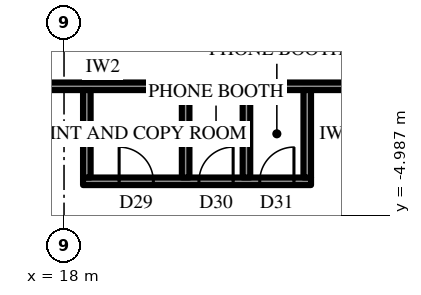
"""IFC4 building model, lengths in metres.
Left out: names, types, materials, properties, quantities, classifications, styles, units other than length and angle.
Written with IfcOpenShell. Run it as: python <this file> out.ifc"""

import sys

from ifc_helpers import new_model, si_unit, direction, frame, frame_2d, origin, place, context, subcontext, project, spatial, rectangle, extrude, element, fill, save


model = new_model("IFC4")
c1 = context("Model", 3, precision=1e-05, world=origin(), true_north=direction((0.0, 1.0)))
c2 = subcontext(c1, "Body", "Model", "MODEL_VIEW")
j1 = project(units=[si_unit("LENGTHUNIT", "METRE"), si_unit("PLANEANGLEUNIT", "RADIAN")], contexts=[c1])
p1 = place(None, origin())
s1 = spatial("IfcSite", under=j1, at=p1, CompositionType="ELEMENT")
p2 = place(p1, origin())
s2 = spatial("IfcBuilding", under=s1, at=p2, CompositionType="ELEMENT")
p3 = place(p2, frame((0.0, 0.0, 345.1)))
s3 = spatial("IfcBuildingStorey", under=s2, at=p3, CompositionType="ELEMENT", Elevation=345.1)
p4 = place(p3, frame((24.677, -10.458, 0.0), z_axis=(0.0, 0.0, 1.0), x_axis=(0.499996453679, 0.866027451244, 0.0)))
e1 = element("IfcWall", 1, at=p4, inside=s3, PredefinedType="SOLIDWALL", context=c2, shape_type="SweptSolid", body=[
    extrude(rectangle(XDim=9.564, YDim=0.3, at=frame_2d((4.782, 0.0))), origin(), (0.0, 0.0, 1.0), 2.9),
])
p5 = place(p4, frame((1.866, 0.0, 0.6)))
e2 = element("IfcOpeningElement", 2, at=p5, cuts=e1, PredefinedType="OPENING", context=c2, shape_type="SweptSolid", body=[
    extrude(rectangle(XDim=2.55, YDim=2.05, at=frame_2d((1.275, 1.025))), frame((0.0, 0.16, 0.0), z_axis=(0.0, -1.0, 0.0), x_axis=(1.0, 0.0, 0.0)), (0.0, 0.0, 1.0), 0.32),
])
p6 = place(p4, frame((6.148, 0.0, 0.6)))
e3 = element("IfcOpeningElement", 3, at=p6, cuts=e1, PredefinedType="OPENING", context=c2, shape_type="SweptSolid", body=[
    extrude(rectangle(XDim=2.55, YDim=2.05, at=frame_2d((1.275, 1.025))), frame((0.0, 0.16, 0.0), z_axis=(0.0, -1.0, 0.0), x_axis=(1.0, 0.0, 0.0)), (0.0, 0.0, 1.0), 0.32),
])
p7 = place(p3, frame((12.425, -1.6, 0.0), z_axis=(0.0, 0.0, 1.0), x_axis=(1.0, 0.0, 0.0)))
e4 = element("IfcWall", 4, at=p7, inside=s3, PredefinedType="PARTITIONING", context=c2, shape_type="SweptSolid", body=[
    extrude(rectangle(XDim=16.5, YDim=0.2, at=frame_2d((8.25, 0.0))), origin(), (0.0, 0.0, 1.0), 4.0),
])
p8 = place(p7, frame((1.15, 0.0, 0.0)))
e5 = element("IfcOpeningElement", 5, at=p8, cuts=e4, PredefinedType="OPENING", context=c2, shape_type="SweptSolid", body=[
    extrude(rectangle(XDim=1.0, YDim=2.2, at=frame_2d((0.5, 1.1))), frame((0.0, 0.11, 0.0), z_axis=(0.0, -1.0, 0.0), x_axis=(1.0, 0.0, 0.0)), (0.0, 0.0, 1.0), 0.22),
])
p9 = place(p3, frame((18.5, -4.1, 0.0), z_axis=(0.0, 0.0, 1.0), x_axis=(1.0, 0.0, 0.0)))
e6 = element("IfcWall", 6, at=p9, inside=s3, PredefinedType="PARTITIONING", context=c2, shape_type="SweptSolid", body=[
    extrude(rectangle(XDim=6.0, YDim=0.2, at=frame_2d((3.0, 0.0))), origin(), (0.0, 0.0, 1.0), 4.0),
])
p10 = place(p9, frame((0.95, 0.0, 0.0)))
e7 = element("IfcOpeningElement", 7, at=p10, cuts=e6, PredefinedType="OPENING", context=c2, shape_type="SweptSolid", body=[
    extrude(rectangle(XDim=0.9, YDim=2.2, at=frame_2d((0.45, 1.1))), frame((0.0, 0.11, 0.0), z_axis=(0.0, -1.0, 0.0), x_axis=(1.0, 0.0, 0.0)), (0.0, 0.0, 1.0), 0.22),
])
p11 = place(p9, frame((3.05, 0.0, 0.0)))
e8 = element("IfcOpeningElement", 8, at=p11, cuts=e6, PredefinedType="OPENING", context=c2, shape_type="SweptSolid", body=[
    extrude(rectangle(XDim=0.9, YDim=2.2, at=frame_2d((0.45, 1.1))), frame((0.0, 0.11, 0.0), z_axis=(0.0, -1.0, 0.0), x_axis=(1.0, 0.0, 0.0)), (0.0, 0.0, 1.0), 0.22),
])
p12 = place(p9, frame((4.65, 0.0, 0.0)))
e9 = element("IfcOpeningElement", 9, at=p12, cuts=e6, PredefinedType="OPENING", context=c2, shape_type="SweptSolid", body=[
    extrude(rectangle(XDim=0.9, YDim=2.2, at=frame_2d((0.45, 1.1))), frame((0.0, 0.11, 0.0), z_axis=(0.0, -1.0, 0.0), x_axis=(1.0, 0.0, 0.0)), (0.0, 0.0, 1.0), 0.22),
])
for number, where, z_axis, x_axis in (
    (10, (18.6, -1.7, 0.0), (0.0, 0.0, 1.0), (0.0, -1.0, 0.0)),
    (11, (21.2, -1.7, 0.0), (0.0, 0.0, 1.0), (0.0, -1.0, 0.0)),
    (12, (22.8, -1.7, 0.0), (0.0, 0.0, 1.0), (0.0, -1.0, 0.0)),
    (13, (24.4, -1.7, 0.0), (0.0, 0.0, 1.0), (0.0, -1.0, 0.0)),
):
    element("IfcWall", number, at=place(p3, frame(where, z_axis=z_axis, x_axis=x_axis)), inside=s3, PredefinedType="PARTITIONING", context=c2, shape_type="SweptSolid", body=[
        extrude(rectangle(XDim=2.3, YDim=0.2, at=frame_2d((1.15, 0.0))), origin(), (0.0, 0.0, 1.0), 4.0),
    ])
p13 = place(p10, origin())
e14 = element("IfcDoor", 14, at=p13, inside=s3, OperationType="SINGLE_SWING_RIGHT", PredefinedType="DOOR", context=c2, shape_type="SweptSolid", body=[
    extrude(rectangle(XDim=0.9, YDim=2.2, at=frame_2d((0.45, 1.1))), frame((0.0, 0.025, 0.0), z_axis=(0.0, -1.0, 0.0), x_axis=(1.0, 0.0, 0.0)), (0.0, 0.0, 1.0), 0.05),
])
fill(e7, e14)
p14 = place(p11, origin())
e15 = element("IfcDoor", 15, at=p14, inside=s3, OperationType="SINGLE_SWING_LEFT", PredefinedType="DOOR", context=c2, shape_type="SweptSolid", body=[
    extrude(rectangle(XDim=0.9, YDim=2.2, at=frame_2d((0.45, 1.1))), frame((0.0, 0.025, 0.0), z_axis=(0.0, -1.0, 0.0), x_axis=(1.0, 0.0, 0.0)), (0.0, 0.0, 1.0), 0.05),
])
fill(e8, e15)
p15 = place(p12, origin())
e16 = element("IfcDoor", 16, at=p15, inside=s3, OperationType="SINGLE_SWING_LEFT", PredefinedType="DOOR", context=c2, shape_type="SweptSolid", body=[
    extrude(rectangle(XDim=0.9, YDim=2.2, at=frame_2d((0.45, 1.1))), frame((0.0, 0.025, 0.0), z_axis=(0.0, -1.0, 0.0), x_axis=(1.0, 0.0, 0.0)), (0.0, 0.0, 1.0), 0.05),
])
fill(e9, e16)
save(model, sys.argv[1])
